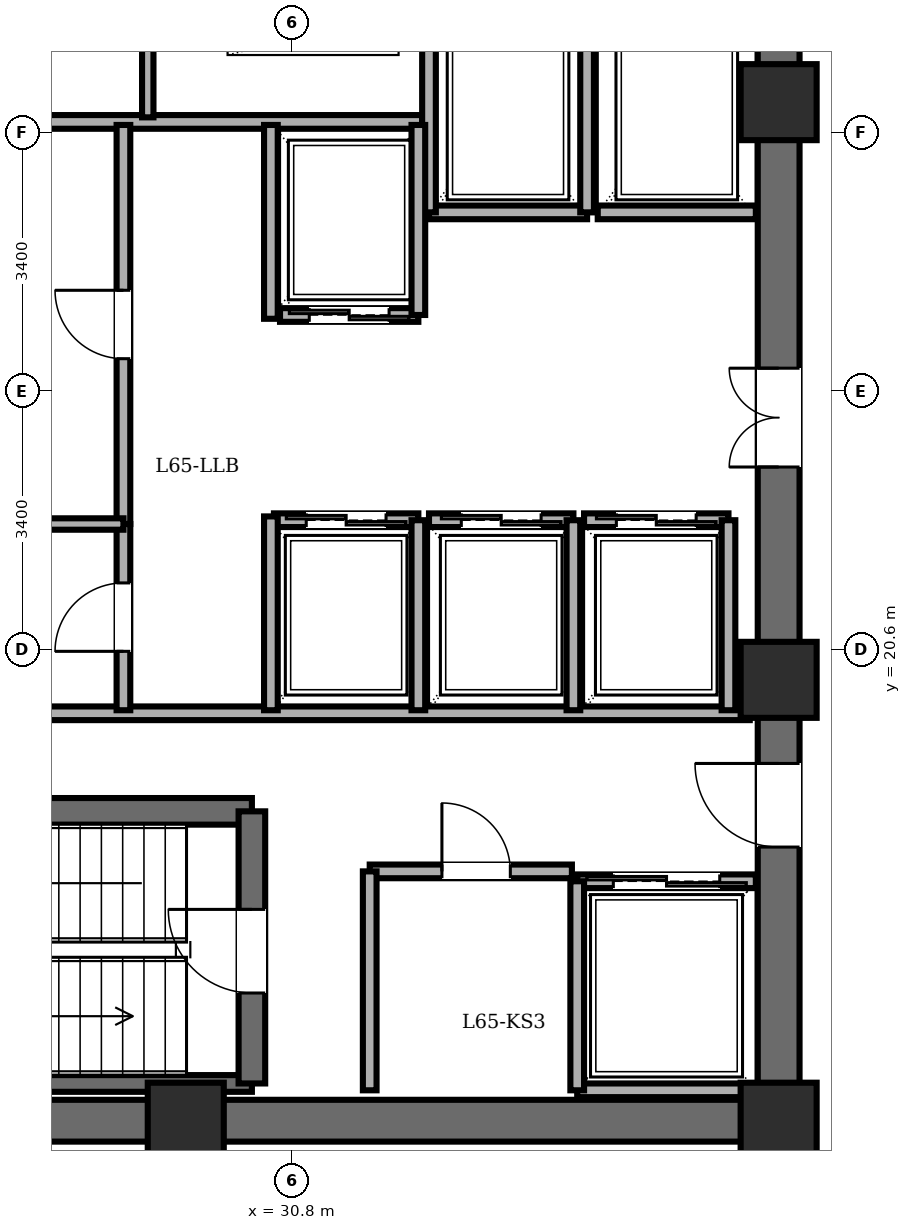
"""IFC4 building model, lengths in metres.
Left out: names, types, materials, properties, quantities, classifications, styles, units other than length and angle.
Written with IfcOpenShell. Run it as: python <this file> out.ifc"""

import sys

from ifc_helpers import new_model, si_unit, direction, frame, frame_2d, origin, origin_2d, place, context, subcontext, project, spatial, rectangle, extrude, element, fill, save


model = new_model("IFC4")
c1 = context("Model", 3, precision=1e-05, world=origin(), true_north=direction((0.0, 1.0)))
c2 = subcontext(c1, "Body", "Model", "MODEL_VIEW")
j1 = project(units=[si_unit("LENGTHUNIT", "METRE"), si_unit("PLANEANGLEUNIT", "RADIAN")], contexts=[c1])
p1 = place(None, origin())
s1 = spatial("IfcSite", under=j1, at=p1, CompositionType="ELEMENT")
p2 = place(p1, origin())
s2 = spatial("IfcBuilding", under=s1, at=p2, CompositionType="ELEMENT")
p3 = place(p2, frame((0.0, 0.0, 248.1)))
s3 = spatial("IfcBuildingStorey", under=s2, at=p3, CompositionType="ELEMENT", Elevation=248.1)
for number, where, z_axis, x_axis in (
    (1, (29.4, 14.4, 0.0), (0.0, 0.0, 1.0), (1.0, 0.0, 0.0)),
    (2, (37.2, 14.4, 0.0), (0.0, 0.0, 1.0), (1.0, 0.0, 0.0)),
    (3, (37.2, 20.2, 0.0), (0.0, 0.0, 1.0), (1.0, 0.0, 0.0)),
    (4, (37.2, 27.8, 0.0), (0.0, 0.0, 1.0), (1.0, 0.0, 0.0)),
):
    element("IfcColumn", number, at=place(p3, frame(where, z_axis=z_axis, x_axis=x_axis)), inside=s3, PredefinedType="COLUMN", context=c2, shape_type="SweptSolid", body=[
        extrude(rectangle(XDim=1.0, YDim=1.0, at=origin_2d()), origin(), (0.0, 0.0, 1.0), 5.6),
    ])
p4 = place(p3, frame((37.2, 14.4, 0.0), z_axis=(0.0, 0.0, 1.0), x_axis=(-1.0, 0.0, 0.0)))
e5 = element("IfcWall", 5, at=p4, inside=s3, PredefinedType="SHEAR", context=c2, shape_type="SweptSolid", body=[
    extrude(rectangle(XDim=15.6, YDim=0.55, at=frame_2d((7.8, 0.0))), origin(), (0.0, 0.0, 1.0), 5.36),
])
p5 = place(p3, frame((37.2, 14.4, 0.0), z_axis=(0.0, 0.0, 1.0), x_axis=(0.0, 1.0, 0.0)))
e6 = element("IfcWall", 6, at=p5, inside=s3, PredefinedType="SHEAR", context=c2, shape_type="SweptSolid", body=[
    extrude(rectangle(XDim=19.2, YDim=0.55, at=frame_2d((9.6, 0.0))), origin(), (0.0, 0.0, 1.0), 5.36),
])
p6 = place(p5, frame((15.8, 0.0, 0.0)))
e7 = element("IfcOpeningElement", 7, at=p6, cuts=e6, PredefinedType="OPENING", context=c2, shape_type="SweptSolid", body=[
    extrude(rectangle(XDim=1.15, YDim=2.15, at=frame_2d((0.575, 1.075))), frame((0.0, 0.285, 0.0), z_axis=(0.0, -1.0, 0.0), x_axis=(1.0, 0.0, 0.0)), (0.0, 0.0, 1.0), 0.57),
])
p7 = place(p5, frame((3.6, 0.0, 0.0)))
e8 = element("IfcOpeningElement", 8, at=p7, cuts=e6, PredefinedType="OPENING", context=c2, shape_type="SweptSolid", body=[
    extrude(rectangle(XDim=1.1, YDim=2.15, at=frame_2d((0.55, 1.075))), frame((0.0, 0.285, 0.0), z_axis=(0.0, -1.0, 0.0), x_axis=(1.0, 0.0, 0.0)), (0.0, 0.0, 1.0), 0.57),
])
p8 = place(p5, frame((8.6, 0.0, 0.0)))
e9 = element("IfcOpeningElement", 9, at=p8, cuts=e6, PredefinedType="OPENING", context=c2, shape_type="SweptSolid", body=[
    extrude(rectangle(XDim=1.3, YDim=2.2, at=frame_2d((0.65, 1.1))), frame((0.0, 0.285, 0.0), z_axis=(0.0, -1.0, 0.0), x_axis=(1.0, 0.0, 0.0)), (0.0, 0.0, 1.0), 0.57),
])
p9 = place(p3, frame((22.48, 18.47, 0.0), z_axis=(0.0, 0.0, 1.0), x_axis=(1.0, 0.0, 0.0)))
e10 = element("IfcWall", 10, at=p9, inside=s3, PredefinedType="SOLIDWALL", context=c2, shape_type="SweptSolid", body=[
    extrude(rectangle(XDim=7.79, YDim=0.35, at=frame_2d((3.895, 0.0))), origin(), (0.0, 0.0, 1.0), 5.36),
])
p10 = place(p3, frame((22.48, 14.89, 0.0), z_axis=(0.0, 0.0, 1.0), x_axis=(1.0, 0.0, 0.0)))
e11 = element("IfcWall", 11, at=p10, inside=s3, PredefinedType="PARTITIONING", context=c2, shape_type="SweptSolid", body=[
    extrude(rectangle(XDim=7.79, YDim=0.22, at=frame_2d((3.895, 0.0))), origin(), (0.0, 0.0, 1.0), 5.36),
])
p11 = place(p3, frame((30.27, 14.89, 0.0), z_axis=(0.0, 0.0, 1.0), x_axis=(0.0, 1.0, 0.0)))
e12 = element("IfcWall", 12, at=p11, inside=s3, PredefinedType="SOLIDWALL", context=c2, shape_type="SweptSolid", body=[
    extrude(rectangle(XDim=3.58, YDim=0.35, at=frame_2d((1.79, 0.0))), origin(), (0.0, 0.0, 1.0), 5.36),
])
p12 = place(p11, frame((1.19, 0.0, 0.0)))
e13 = element("IfcOpeningElement", 13, at=p12, cuts=e12, PredefinedType="OPENING", context=c2, shape_type="SweptSolid", body=[
    extrude(rectangle(XDim=1.1, YDim=2.15, at=frame_2d((0.55, 1.075))), frame((0.0, 0.185, 0.0), z_axis=(0.0, -1.0, 0.0), x_axis=(1.0, 0.0, 0.0)), (0.0, 0.0, 1.0), 0.37),
])
p13 = place(p3, frame((21.95, 27.54, 0.0), z_axis=(0.0, 0.0, 1.0), x_axis=(1.0, 0.0, 0.0)))
e14 = element("IfcWall", 14, at=p13, inside=s3, PredefinedType="PARTITIONING", context=c2, shape_type="SweptSolid", body=[
    extrude(rectangle(XDim=10.56, YDim=0.18, at=frame_2d((5.28, 0.0))), origin(), (0.0, 0.0, 1.0), 5.36),
])
p14 = place(p3, frame((28.9, 27.6, 0.0), z_axis=(0.0, 0.0, 1.0), x_axis=(0.0, 1.0, 0.0)))
e15 = element("IfcWall", 15, at=p14, inside=s3, PredefinedType="PARTITIONING", context=c2, shape_type="SweptSolid", body=[
    extrude(rectangle(XDim=1.52, YDim=0.15, at=frame_2d((0.76, 0.0))), origin(), (0.0, 0.0, 1.0), 5.36),
])
p15 = place(p3, frame((21.95, 19.76, 0.0), z_axis=(0.0, 0.0, 1.0), x_axis=(1.0, 0.0, 0.0)))
e16 = element("IfcWall", 16, at=p15, inside=s3, PredefinedType="PARTITIONING", context=c2, shape_type="SweptSolid", body=[
    extrude(rectangle(XDim=14.87, YDim=0.18, at=frame_2d((7.435, 0.0))), origin(), (0.0, 0.0, 1.0), 5.36),
])
p16 = place(p3, frame((31.82, 17.68, 0.0), z_axis=(0.0, 0.0, 1.0), x_axis=(1.0, 0.0, 0.0)))
e17 = element("IfcWall", 17, at=p16, inside=s3, PredefinedType="PARTITIONING", context=c2, shape_type="SweptSolid", body=[
    extrude(rectangle(XDim=2.66, YDim=0.18, at=frame_2d((1.33, 0.0))), origin(), (0.0, 0.0, 1.0), 5.36),
])
p17 = place(p16, frame((0.95, 0.0, 0.0)))
e18 = element("IfcOpeningElement", 18, at=p17, cuts=e17, PredefinedType="OPENING", context=c2, shape_type="SweptSolid", body=[
    extrude(rectangle(XDim=0.9, YDim=2.05, at=frame_2d((0.45, 1.025))), frame((0.0, 0.1, 0.0), z_axis=(0.0, -1.0, 0.0), x_axis=(1.0, 0.0, 0.0)), (0.0, 0.0, 1.0), 0.2),
])
p18 = place(p3, frame((31.82, 14.8, 0.0), z_axis=(0.0, 0.0, 1.0), x_axis=(0.0, 1.0, 0.0)))
e19 = element("IfcWall", 19, at=p18, inside=s3, PredefinedType="PARTITIONING", context=c2, shape_type="SweptSolid", body=[
    extrude(rectangle(XDim=2.88, YDim=0.18, at=frame_2d((1.44, 0.0))), origin(), (0.0, 0.0, 1.0), 5.36),
])
p19 = place(p3, frame((34.68, 26.35, 0.0), z_axis=(0.0, 0.0, 1.0), x_axis=(-1.0, 0.0, 0.0)))
e20 = element("IfcWall", 20, at=p19, inside=s3, PredefinedType="PARTITIONING", context=c2, shape_type="SweptSolid", body=[
    extrude(rectangle(XDim=2.08, YDim=0.18, at=frame_2d((1.04, 0.0))), origin(), (0.0, 0.0, 1.0), 5.36),
])
for number, where, z_axis, x_axis in (
    (21, (34.68, 26.35, 0.0), (0.0, 0.0, 1.0), (0.0, 1.0, 0.0)),
    (22, (32.6, 29.08, 0.0), (0.0, 0.0, 1.0), (0.0, -1.0, 0.0)),
):
    element("IfcWall", number, at=place(p3, frame(where, z_axis=z_axis, x_axis=x_axis)), inside=s3, PredefinedType="PARTITIONING", context=c2, shape_type="SweptSolid", body=[
        extrude(rectangle(XDim=2.73, YDim=0.18, at=frame_2d((1.365, 0.0))), origin(), (0.0, 0.0, 1.0), 5.36),
    ])
p20 = place(p3, frame((36.9, 26.35, 0.0), z_axis=(0.0, 0.0, 1.0), x_axis=(-1.0, 0.0, 0.0)))
e23 = element("IfcWall", 23, at=p20, inside=s3, PredefinedType="PARTITIONING", context=c2, shape_type="SweptSolid", body=[
    extrude(rectangle(XDim=2.08, YDim=0.18, at=frame_2d((1.04, 0.0))), origin(), (0.0, 0.0, 1.0), 5.36),
])
p21 = place(p3, frame((34.55, 17.55, 0.0), z_axis=(0.0, 0.0, 1.0), x_axis=(1.0, 0.0, 0.0)))
e24 = element("IfcWall", 24, at=p21, inside=s3, PredefinedType="PARTITIONING", context=c2, shape_type="SweptSolid", body=[
    extrude(rectangle(XDim=2.35, YDim=0.18, at=frame_2d((1.175, 0.0))), origin(), (0.0, 0.0, 1.0), 5.36),
])
p22 = place(p21, frame((0.475, 0.0, 0.0)))
e25 = element("IfcOpeningElement", 25, at=p22, cuts=e24, PredefinedType="OPENING", context=c2, shape_type="SweptSolid", body=[
    extrude(rectangle(XDim=1.4, YDim=2.3, at=frame_2d((0.7, 1.15))), frame((0.0, 0.1, 0.0), z_axis=(0.0, -1.0, 0.0), x_axis=(1.0, 0.0, 0.0)), (0.0, 0.0, 1.0), 0.2),
])
p23 = place(p3, frame((36.9, 14.8, 0.0), z_axis=(0.0, 0.0, 1.0), x_axis=(-1.0, 0.0, 0.0)))
e26 = element("IfcWall", 26, at=p23, inside=s3, PredefinedType="PARTITIONING", context=c2, shape_type="SweptSolid", body=[
    extrude(rectangle(XDim=2.35, YDim=0.18, at=frame_2d((1.175, 0.0))), origin(), (0.0, 0.0, 1.0), 2.942),
])
p24 = place(p3, frame((34.55, 17.55, 0.0), z_axis=(0.0, 0.0, 1.0), x_axis=(0.0, -1.0, 0.0)))
e27 = element("IfcWall", 27, at=p24, inside=s3, PredefinedType="PARTITIONING", context=c2, shape_type="SweptSolid", body=[
    extrude(rectangle(XDim=2.75, YDim=0.18, at=frame_2d((1.375, 0.0))), origin(), (0.0, 0.0, 1.0), 5.36),
])
p25 = place(p3, frame((32.46, 25.0, 0.0), z_axis=(0.0, 0.0, 1.0), x_axis=(-1.0, 0.0, 0.0)))
e28 = element("IfcWall", 28, at=p25, inside=s3, PredefinedType="PARTITIONING", context=c2, shape_type="SweptSolid", body=[
    extrude(rectangle(XDim=1.82, YDim=0.18, at=frame_2d((0.91, 0.0))), origin(), (0.0, 0.0, 1.0), 5.36),
])
p26 = place(p25, frame((0.385, 0.0, 0.0)))
e29 = element("IfcOpeningElement", 29, at=p26, cuts=e28, PredefinedType="OPENING", context=c2, shape_type="SweptSolid", body=[
    extrude(rectangle(XDim=1.05, YDim=2.2, at=frame_2d((0.525, 1.1))), frame((0.0, 0.1, 0.0), z_axis=(0.0, -1.0, 0.0), x_axis=(1.0, 0.0, 0.0)), (0.0, 0.0, 1.0), 0.2),
])
p27 = place(p3, frame((32.46, 25.0, 0.0), z_axis=(0.0, 0.0, 1.0), x_axis=(0.0, 1.0, 0.0)))
e30 = element("IfcWall", 30, at=p27, inside=s3, PredefinedType="PARTITIONING", context=c2, shape_type="SweptSolid", body=[
    extrude(rectangle(XDim=2.5, YDim=0.18, at=frame_2d((1.25, 0.0))), origin(), (0.0, 0.0, 1.0), 5.36),
])
p28 = place(p3, frame((30.56, 22.3, 0.0), z_axis=(0.0, 0.0, 1.0), x_axis=(1.0, 0.0, 0.0)))
e31 = element("IfcWall", 31, at=p28, inside=s3, PredefinedType="PARTITIONING", context=c2, shape_type="SweptSolid", body=[
    extrude(rectangle(XDim=1.9, YDim=0.18, at=frame_2d((0.95, 0.0))), origin(), (0.0, 0.0, 1.0), 5.36),
])
p29 = place(p28, frame((0.425, 0.0, 0.0)))
e32 = element("IfcOpeningElement", 32, at=p29, cuts=e31, PredefinedType="OPENING", context=c2, shape_type="SweptSolid", body=[
    extrude(rectangle(XDim=1.05, YDim=2.2, at=frame_2d((0.525, 1.1))), frame((0.0, 0.1, 0.0), z_axis=(0.0, -1.0, 0.0), x_axis=(1.0, 0.0, 0.0)), (0.0, 0.0, 1.0), 0.2),
])
p30 = place(p3, frame((32.46, 19.8, 0.0), z_axis=(0.0, 0.0, 1.0), x_axis=(0.0, 1.0, 0.0)))
e33 = element("IfcWall", 33, at=p30, inside=s3, PredefinedType="PARTITIONING", context=c2, shape_type="SweptSolid", body=[
    extrude(rectangle(XDim=2.5, YDim=0.18, at=frame_2d((1.25, 0.0))), origin(), (0.0, 0.0, 1.0), 5.36),
])
p31 = place(p3, frame((32.6, 22.3, 0.0), z_axis=(0.0, 0.0, 1.0), x_axis=(1.0, 0.0, 0.0)))
e34 = element("IfcWall", 34, at=p31, inside=s3, PredefinedType="PARTITIONING", context=c2, shape_type="SweptSolid", body=[
    extrude(rectangle(XDim=1.9, YDim=0.18, at=frame_2d((0.95, 0.0))), origin(), (0.0, 0.0, 1.0), 5.36),
])
p32 = place(p31, frame((0.425, 0.0, 0.0)))
e35 = element("IfcOpeningElement", 35, at=p32, cuts=e34, PredefinedType="OPENING", context=c2, shape_type="SweptSolid", body=[
    extrude(rectangle(XDim=1.05, YDim=2.2, at=frame_2d((0.525, 1.1))), frame((0.0, 0.1, 0.0), z_axis=(0.0, -1.0, 0.0), x_axis=(1.0, 0.0, 0.0)), (0.0, 0.0, 1.0), 0.2),
])
p33 = place(p3, frame((34.5, 19.8, 0.0), z_axis=(0.0, 0.0, 1.0), x_axis=(0.0, 1.0, 0.0)))
e36 = element("IfcWall", 36, at=p33, inside=s3, PredefinedType="PARTITIONING", context=c2, shape_type="SweptSolid", body=[
    extrude(rectangle(XDim=2.5, YDim=0.18, at=frame_2d((1.25, 0.0))), origin(), (0.0, 0.0, 1.0), 5.36),
])
p34 = place(p3, frame((34.64, 22.3, 0.0), z_axis=(0.0, 0.0, 1.0), x_axis=(1.0, 0.0, 0.0)))
e37 = element("IfcWall", 37, at=p34, inside=s3, PredefinedType="PARTITIONING", context=c2, shape_type="SweptSolid", body=[
    extrude(rectangle(XDim=1.9, YDim=0.18, at=frame_2d((0.95, 0.0))), origin(), (0.0, 0.0, 1.0), 5.36),
])
p35 = place(p34, frame((0.425, 0.0, 0.0)))
e38 = element("IfcOpeningElement", 38, at=p35, cuts=e37, PredefinedType="OPENING", context=c2, shape_type="SweptSolid", body=[
    extrude(rectangle(XDim=1.05, YDim=2.2, at=frame_2d((0.525, 1.1))), frame((0.0, 0.1, 0.0), z_axis=(0.0, -1.0, 0.0), x_axis=(1.0, 0.0, 0.0)), (0.0, 0.0, 1.0), 0.2),
])
p36 = place(p3, frame((36.54, 19.8, 0.0), z_axis=(0.0, 0.0, 1.0), x_axis=(0.0, 1.0, 0.0)))
e39 = element("IfcWall", 39, at=p36, inside=s3, PredefinedType="PARTITIONING", context=c2, shape_type="SweptSolid", body=[
    extrude(rectangle(XDim=2.5, YDim=0.18, at=frame_2d((1.25, 0.0))), origin(), (0.0, 0.0, 1.0), 5.36),
])
for number, where, z_axis, x_axis in (
    (40, (30.52, 24.95, 0.0), (0.0, 0.0, 1.0), (0.0, 1.0, 0.0)),
    (41, (30.52, 19.8, 0.0), (0.0, 0.0, 1.0), (0.0, 1.0, 0.0)),
):
    element("IfcWall", number, at=place(p3, frame(where, z_axis=z_axis, x_axis=x_axis)), inside=s3, PredefinedType="PARTITIONING", context=c2, shape_type="SweptSolid", body=[
        extrude(rectangle(XDim=2.55, YDim=0.18, at=frame_2d((1.275, 0.0))), origin(), (0.0, 0.0, 1.0), 5.36),
    ])
p37 = place(p3, frame((28.58, 22.25, 0.0), z_axis=(0.0, 0.0, 1.0), x_axis=(0.0, 1.0, 0.0)))
e42 = element("IfcWall", 42, at=p37, inside=s3, PredefinedType="PARTITIONING", context=c2, shape_type="SweptSolid", body=[
    extrude(rectangle(XDim=5.25, YDim=0.18, at=frame_2d((2.625, 0.0))), origin(), (0.0, 0.0, 1.0), 5.36),
])
p38 = place(p37, frame((2.175, 0.0, 0.0)))
e43 = element("IfcOpeningElement", 43, at=p38, cuts=e42, PredefinedType="OPENING", context=c2, shape_type="SweptSolid", body=[
    extrude(rectangle(XDim=0.9, YDim=2.05, at=frame_2d((0.45, 1.025))), frame((0.0, 0.1, 0.0), z_axis=(0.0, -1.0, 0.0), x_axis=(1.0, 0.0, 0.0)), (0.0, 0.0, 1.0), 0.2),
])
p39 = place(p3, frame((28.58, 19.8, 0.0), z_axis=(0.0, 0.0, 1.0), x_axis=(0.0, 1.0, 0.0)))
e44 = element("IfcWall", 44, at=p39, inside=s3, PredefinedType="PARTITIONING", context=c2, shape_type="SweptSolid", body=[
    extrude(rectangle(XDim=2.45, YDim=0.18, at=frame_2d((1.225, 0.0))), origin(), (0.0, 0.0, 1.0), 5.36),
])
p40 = place(p39, frame((0.775, 0.0, 0.0)))
e45 = element("IfcOpeningElement", 45, at=p40, cuts=e44, PredefinedType="OPENING", context=c2, shape_type="SweptSolid", body=[
    extrude(rectangle(XDim=0.9, YDim=2.05, at=frame_2d((0.45, 1.025))), frame((0.0, 0.1, 0.0), z_axis=(0.0, -1.0, 0.0), x_axis=(1.0, 0.0, 0.0)), (0.0, 0.0, 1.0), 0.2),
])
p41 = place(p3, frame((21.95, 22.25, 0.0), z_axis=(0.0, 0.0, 1.0), x_axis=(1.0, 0.0, 0.0)))
e46 = element("IfcWall", 46, at=p41, inside=s3, PredefinedType="PARTITIONING", context=c2, shape_type="SweptSolid", body=[
    extrude(rectangle(XDim=6.63, YDim=0.15, at=frame_2d((3.315, 0.0))), origin(), (0.0, 0.0, 1.0), 5.36),
])
p42 = place(p12, origin())
e47 = element("IfcDoor", 47, at=p42, inside=s3, OperationType="SINGLE_SWING_RIGHT", PredefinedType="DOOR", context=c2, shape_type="SweptSolid", body=[
    extrude(rectangle(XDim=1.1, YDim=2.15, at=frame_2d((0.55, 1.075))), frame((0.0, 0.025, 0.0), z_axis=(0.0, -1.0, 0.0), x_axis=(1.0, 0.0, 0.0)), (0.0, 0.0, 1.0), 0.05),
])
fill(e13, e47)
p43 = place(p7, origin())
e48 = element("IfcDoor", 48, at=p43, inside=s3, OperationType="SINGLE_SWING_RIGHT", PredefinedType="DOOR", context=c2, shape_type="SweptSolid", body=[
    extrude(rectangle(XDim=1.1, YDim=2.15, at=frame_2d((0.55, 1.075))), frame((0.0, 0.025, 0.0), z_axis=(0.0, -1.0, 0.0), x_axis=(1.0, 0.0, 0.0)), (0.0, 0.0, 1.0), 0.05),
])
fill(e8, e48)
p44 = place(p17, origin())
e49 = element("IfcDoor", 49, at=p44, inside=s3, OperationType="SINGLE_SWING_LEFT", PredefinedType="DOOR", context=c2, shape_type="SweptSolid", body=[
    extrude(rectangle(XDim=0.9, YDim=2.05, at=frame_2d((0.45, 1.025))), frame((0.0, 0.025, 0.0), z_axis=(0.0, -1.0, 0.0), x_axis=(1.0, 0.0, 0.0)), (0.0, 0.0, 1.0), 0.05),
])
fill(e18, e49)
p45 = place(p22, origin())
e50 = element("IfcDoor", 50, at=p45, inside=s3, OperationType="DOUBLE_DOOR_SLIDING", PredefinedType="DOOR", context=c2, shape_type="SweptSolid", body=[
    extrude(rectangle(XDim=1.4, YDim=2.3, at=frame_2d((0.7, 1.15))), frame((0.0, 0.025, 0.0), z_axis=(0.0, -1.0, 0.0), x_axis=(1.0, 0.0, 0.0)), (0.0, 0.0, 1.0), 0.05),
])
fill(e25, e50)
p46 = place(p26, origin())
e51 = element("IfcDoor", 51, at=p46, inside=s3, OperationType="DOUBLE_DOOR_SLIDING", PredefinedType="DOOR", context=c2, shape_type="SweptSolid", body=[
    extrude(rectangle(XDim=1.05, YDim=2.2, at=frame_2d((0.525, 1.1))), frame((0.0, 0.025, 0.0), z_axis=(0.0, -1.0, 0.0), x_axis=(1.0, 0.0, 0.0)), (0.0, 0.0, 1.0), 0.05),
])
fill(e29, e51)
p47 = place(p29, origin())
e52 = element("IfcDoor", 52, at=p47, inside=s3, OperationType="DOUBLE_DOOR_SLIDING", PredefinedType="DOOR", context=c2, shape_type="SweptSolid", body=[
    extrude(rectangle(XDim=1.05, YDim=2.2, at=frame_2d((0.525, 1.1))), frame((0.0, 0.025, 0.0), z_axis=(0.0, -1.0, 0.0), x_axis=(1.0, 0.0, 0.0)), (0.0, 0.0, 1.0), 0.05),
])
fill(e32, e52)
p48 = place(p32, origin())
e53 = element("IfcDoor", 53, at=p48, inside=s3, OperationType="DOUBLE_DOOR_SLIDING", PredefinedType="DOOR", context=c2, shape_type="SweptSolid", body=[
    extrude(rectangle(XDim=1.05, YDim=2.2, at=frame_2d((0.525, 1.1))), frame((0.0, 0.025, 0.0), z_axis=(0.0, -1.0, 0.0), x_axis=(1.0, 0.0, 0.0)), (0.0, 0.0, 1.0), 0.05),
])
fill(e35, e53)
p49 = place(p35, origin())
e54 = element("IfcDoor", 54, at=p49, inside=s3, OperationType="DOUBLE_DOOR_SLIDING", PredefinedType="DOOR", context=c2, shape_type="SweptSolid", body=[
    extrude(rectangle(XDim=1.05, YDim=2.2, at=frame_2d((0.525, 1.1))), frame((0.0, 0.025, 0.0), z_axis=(0.0, -1.0, 0.0), x_axis=(1.0, 0.0, 0.0)), (0.0, 0.0, 1.0), 0.05),
])
fill(e38, e54)
p50 = place(p38, origin())
e55 = element("IfcDoor", 55, at=p50, inside=s3, OperationType="SINGLE_SWING_RIGHT", PredefinedType="DOOR", context=c2, shape_type="SweptSolid", body=[
    extrude(rectangle(XDim=0.9, YDim=2.05, at=frame_2d((0.45, 1.025))), frame((0.0, 0.025, 0.0), z_axis=(0.0, -1.0, 0.0), x_axis=(1.0, 0.0, 0.0)), (0.0, 0.0, 1.0), 0.05),
])
fill(e43, e55)
p51 = place(p40, origin())
e56 = element("IfcDoor", 56, at=p51, inside=s3, OperationType="SINGLE_SWING_LEFT", PredefinedType="DOOR", context=c2, shape_type="SweptSolid", body=[
    extrude(rectangle(XDim=0.9, YDim=2.05, at=frame_2d((0.45, 1.025))), frame((0.0, 0.025, 0.0), z_axis=(0.0, -1.0, 0.0), x_axis=(1.0, 0.0, 0.0)), (0.0, 0.0, 1.0), 0.05),
])
fill(e45, e56)
p52 = place(p8, origin())
e57 = element("IfcDoor", 57, at=p52, inside=s3, OperationType="DOUBLE_DOOR_SINGLE_SWING", PredefinedType="DOOR", context=c2, shape_type="SweptSolid", body=[
    extrude(rectangle(XDim=1.3, YDim=2.2, at=frame_2d((0.65, 1.1))), frame((0.0, 0.025, 0.0), z_axis=(0.0, -1.0, 0.0), x_axis=(1.0, 0.0, 0.0)), (0.0, 0.0, 1.0), 0.05),
])
fill(e9, e57)
save(model, sys.argv[1])
